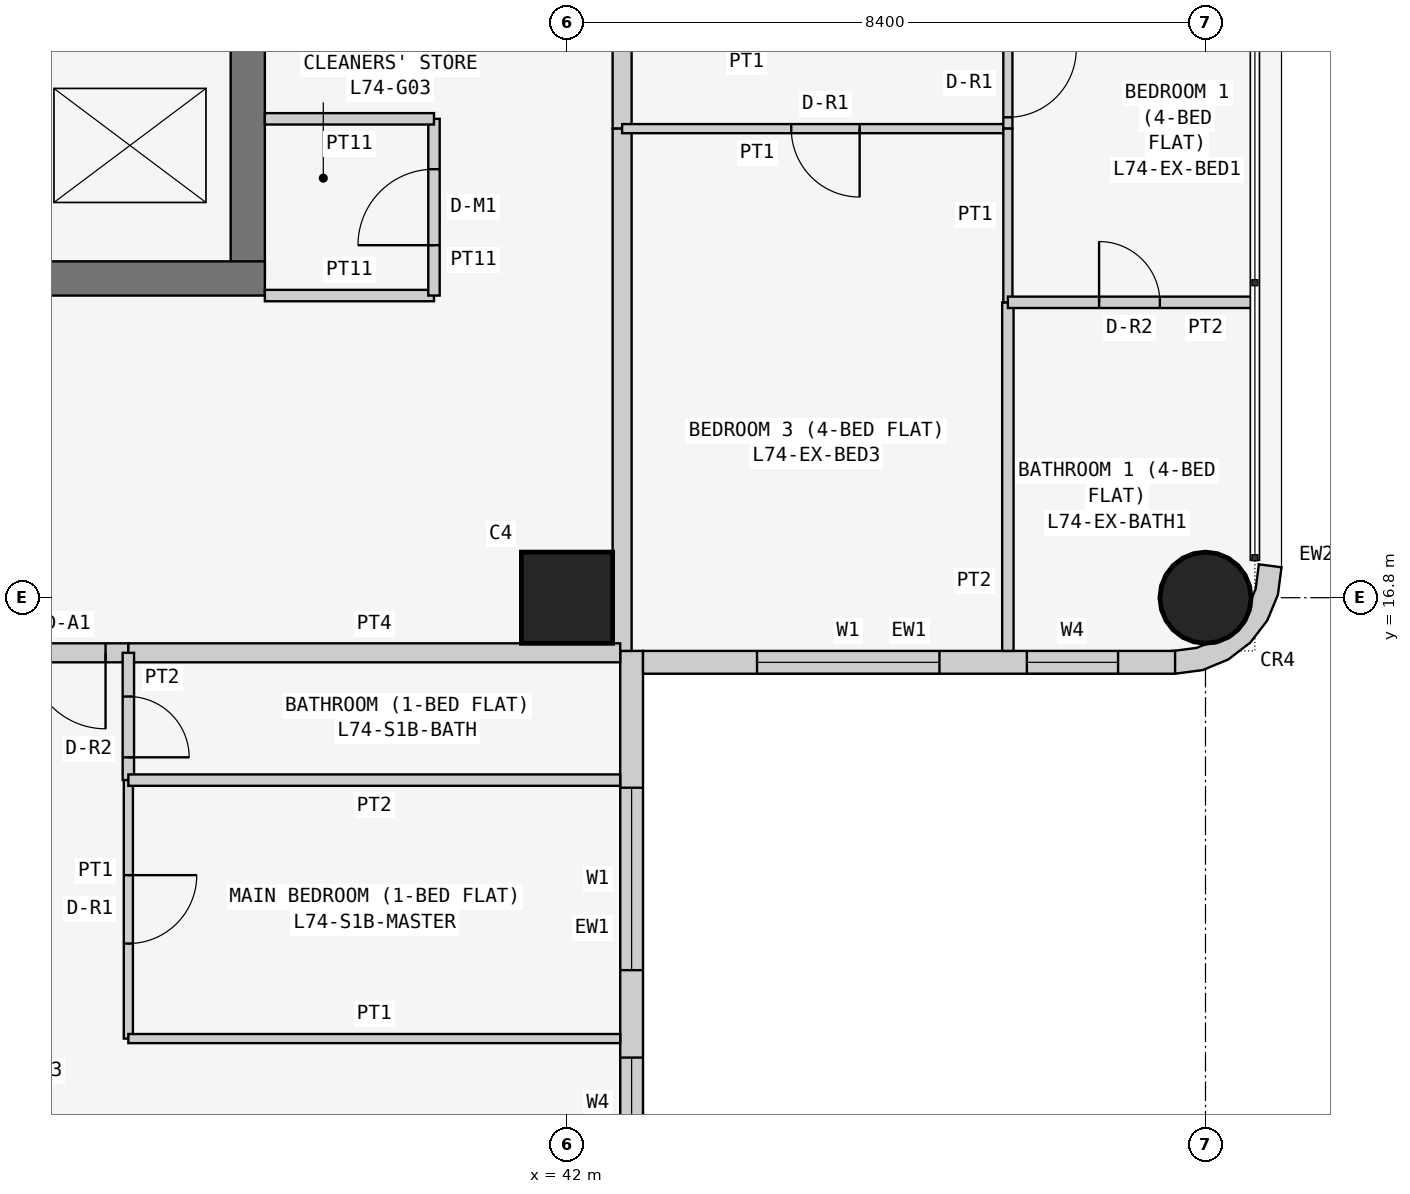
"""IFC4 building model, lengths in metres.
Left out: names, types, materials, properties, quantities, classifications, styles, units other than length and angle.
Written with IfcOpenShell. Run it as: python <this file> out.ifc"""

import sys

from ifc_helpers import new_model, si_unit, direction, frame, frame_2d, origin, origin_2d, place, context, subcontext, project, spatial, polyline, rectangle, circle, outline, extrude, element, fill, save


model = new_model("IFC4")
c1 = context("Model", 3, precision=1e-05, world=origin(), true_north=direction((0.0, 1.0)))
c2 = subcontext(c1, "Body", "Model", "MODEL_VIEW")
j1 = project(units=[si_unit("LENGTHUNIT", "METRE"), si_unit("PLANEANGLEUNIT", "RADIAN")], contexts=[c1])
p1 = place(None, origin())
s1 = spatial("IfcSite", under=j1, at=p1, CompositionType="ELEMENT")
p2 = place(p1, origin())
s2 = spatial("IfcBuilding", under=s1, at=p2, CompositionType="ELEMENT")
p3 = place(p2, frame((0.0, 0.0, 282.9)))
s3 = spatial("IfcBuildingStorey", under=s2, at=p3, CompositionType="ELEMENT", Elevation=282.9)
p4 = place(p3, frame((42.0, 16.8, 0.0), z_axis=(0.0, 0.0, 1.0), x_axis=(1.0, 0.0, 0.0)))
e1 = element("IfcColumn", 1, at=p4, inside=s3, PredefinedType="COLUMN", context=c2, shape_type="SweptSolid", body=[
    extrude(rectangle(XDim=1.2, YDim=1.2, at=origin_2d()), origin(), (0.0, 0.0, 1.0), 3.6),
])
p5 = place(p3, frame((50.4, 16.8, 0.0), z_axis=(0.0, 0.0, 1.0), x_axis=(1.0, 0.0, 0.0)))
e2 = element("IfcColumn", 2, at=p5, inside=s3, PredefinedType="COLUMN", context=c2, shape_type="SweptSolid", body=[
    extrude(circle(Radius=0.6, at=origin_2d()), origin(), (0.0, 0.0, 1.0), 3.6),
])
p6 = place(p3, frame((21.0, 21.0, 0.0), z_axis=(0.0, 0.0, 1.0), x_axis=(1.0, 0.0, 0.0)))
e3 = element("IfcWall", 3, at=p6, inside=s3, PredefinedType="SHEAR", context=c2, shape_type="SweptSolid", body=[
    extrude(rectangle(XDim=17.025, YDim=0.45, at=frame_2d((8.512, 0.0))), origin(), (0.0, 0.0, 1.0), 3.6),
])
p7 = place(p3, frame((37.8, 21.0, 0.0), z_axis=(0.0, 0.0, 1.0), x_axis=(0.0, 1.0, 0.0)))
e4 = element("IfcWall", 4, at=p7, inside=s3, PredefinedType="SHEAR", context=c2, shape_type="SweptSolid", body=[
    extrude(rectangle(XDim=17.025, YDim=0.45, at=frame_2d((8.512, 0.0))), origin(), (0.0, 0.0, 1.0), 3.6),
])
p8 = place(p7, frame((5.2, 0.0, 0.0)))
e5 = element("IfcOpeningElement", 5, at=p8, cuts=e4, PredefinedType="OPENING", context=c2, shape_type="SweptSolid", body=[
    extrude(rectangle(XDim=1.2, YDim=2.1, at=frame_2d((0.6, 1.05))), frame((0.0, 0.235, 0.0), z_axis=(0.0, -1.0, 0.0), x_axis=(1.0, 0.0, 0.0)), (0.0, 0.0, 1.0), 0.47),
])
p9 = place(p3, frame((42.85, 8.8, 0.0), z_axis=(0.0, 0.0, 1.0), x_axis=(0.0, 1.0, 0.0)))
e6 = element("IfcWall", 6, at=p9, inside=s3, PredefinedType="SOLIDWALL", context=c2, shape_type="SweptSolid", body=[
    extrude(rectangle(XDim=7.3, YDim=0.3, at=frame_2d((3.65, 0.0))), origin(), (0.0, 0.0, 1.0), 3.45),
])
p10 = place(p9, frame((3.1, 0.0, 0.9)))
e7 = element("IfcOpeningElement", 7, at=p10, cuts=e6, PredefinedType="OPENING", context=c2, shape_type="SweptSolid", body=[
    extrude(rectangle(XDim=2.4, YDim=1.5, at=frame_2d((1.2, 0.75))), frame((0.0, 0.16, 0.0), z_axis=(0.0, -1.0, 0.0), x_axis=(1.0, 0.0, 0.0)), (0.0, 0.0, 1.0), 0.32),
])
p11 = place(p9, frame((0.75, 0.0, 0.9)))
e8 = element("IfcOpeningElement", 8, at=p11, cuts=e6, PredefinedType="OPENING", context=c2, shape_type="SweptSolid", body=[
    extrude(rectangle(XDim=1.2, YDim=1.5, at=frame_2d((0.6, 0.75))), frame((0.0, 0.16, 0.0), z_axis=(0.0, -1.0, 0.0), x_axis=(1.0, 0.0, 0.0)), (0.0, 0.0, 1.0), 0.32),
])
p12 = place(p3, frame((43.0, 15.95, 0.0), z_axis=(0.0, 0.0, 1.0), x_axis=(1.0, 0.0, 0.0)))
e9 = element("IfcWall", 9, at=p12, inside=s3, PredefinedType="SOLIDWALL", context=c2, shape_type="SweptSolid", body=[
    extrude(rectangle(XDim=7.0, YDim=0.3, at=frame_2d((3.5, 0.0))), origin(), (0.0, 0.0, 1.0), 3.45),
])
p13 = place(p12, frame((1.5, 0.0, 0.9)))
e10 = element("IfcOpeningElement", 10, at=p13, cuts=e9, PredefinedType="OPENING", context=c2, shape_type="SweptSolid", body=[
    extrude(rectangle(XDim=2.4, YDim=1.5, at=frame_2d((1.2, 0.75))), frame((0.0, 0.16, 0.0), z_axis=(0.0, -1.0, 0.0), x_axis=(1.0, 0.0, 0.0)), (0.0, 0.0, 1.0), 0.32),
])
p14 = place(p12, frame((5.05, 0.0, 0.9)))
e11 = element("IfcOpeningElement", 11, at=p14, cuts=e9, PredefinedType="OPENING", context=c2, shape_type="SweptSolid", body=[
    extrude(rectangle(XDim=1.2, YDim=1.5, at=frame_2d((0.6, 0.75))), frame((0.0, 0.16, 0.0), z_axis=(0.0, -1.0, 0.0), x_axis=(1.0, 0.0, 0.0)), (0.0, 0.0, 1.0), 0.32),
])
p15 = place(p3, frame((50.038, 16.224, 0.0), z_axis=(0.0, 0.0, 1.0), x_axis=(0.707106781187, -0.707106781187, 0.0)))
e12 = element("IfcWall", 12, at=p15, inside=s3, PredefinedType="SOLIDWALL", context=c2, shape_type="SweptSolid", body=[
    extrude(outline(polyline([(0.047, 1.455), (0.233, 1.212), (0.292, 1.069), (0.358, 1.003), (0.449, 0.782), (0.449, 0.543), (0.358, 0.322), (0.292, 0.257), (0.233, 0.114), (0.047, -0.129), (0.033, -0.143), (0.273, -0.327), (0.495, -0.037), (0.635, 0.301), (0.683, 0.663), (0.635, 1.025), (0.495, 1.363), (0.273, 1.653), (0.033, 1.469), (0.047, 1.455)])), origin(), (0.0, 0.0, 1.0), 3.45),
])
p16 = place(p3, frame((38.025, 20.775, 0.0), z_axis=(0.0, 0.0, 1.0), x_axis=(1.0, 0.0, 0.0)))
e13 = element("IfcWall", 13, at=p16, inside=s3, PredefinedType="PARTITIONING", context=c2, shape_type="SweptSolid", body=[
    extrude(rectangle(XDim=2.225, YDim=0.15, at=frame_2d((1.113, 0.0))), origin(), (0.0, 0.0, 1.0), 3.45),
])
p17 = place(p3, frame((40.25, 20.775, 0.0), z_axis=(0.0, 0.0, 1.0), x_axis=(0.0, 1.0, 0.0)))
e14 = element("IfcWall", 14, at=p17, inside=s3, PredefinedType="PARTITIONING", context=c2, shape_type="SweptSolid", body=[
    extrude(rectangle(XDim=2.325, YDim=0.15, at=frame_2d((1.163, 0.0))), origin(), (0.0, 0.0, 1.0), 3.45),
])
p18 = place(p17, frame((0.663, 0.0, 0.0)))
e15 = element("IfcOpeningElement", 15, at=p18, cuts=e14, PredefinedType="OPENING", context=c2, shape_type="SweptSolid", body=[
    extrude(rectangle(XDim=1.0, YDim=2.1, at=frame_2d((0.5, 1.05))), frame((0.0, 0.085, 0.0), z_axis=(0.0, -1.0, 0.0), x_axis=(1.0, 0.0, 0.0)), (0.0, 0.0, 1.0), 0.17),
])
p19 = place(p3, frame((40.25, 23.1, 0.0), z_axis=(0.0, 0.0, 1.0), x_axis=(-1.0, 0.0, 0.0)))
e16 = element("IfcWall", 16, at=p19, inside=s3, PredefinedType="PARTITIONING", context=c2, shape_type="SweptSolid", body=[
    extrude(rectangle(XDim=2.225, YDim=0.15, at=frame_2d((1.113, 0.0))), origin(), (0.0, 0.0, 1.0), 3.45),
])
p20 = place(p3, frame((42.725, 24.171, 0.0), z_axis=(0.0, 0.0, 1.0), x_axis=(0.0, -1.0, 0.0)))
e17 = element("IfcWall", 17, at=p20, inside=s3, PredefinedType="PARTITIONING", context=c2, shape_type="SweptSolid", body=[
    extrude(rectangle(XDim=1.2, YDim=0.25, at=frame_2d((0.6, 0.0))), origin(), (0.0, 0.0, 1.0), 3.45),
])
p21 = place(p3, frame((42.725, 22.971, 0.0), z_axis=(0.0, 0.0, 1.0), x_axis=(0.0, -1.0, 0.0)))
e18 = element("IfcWall", 18, at=p21, inside=s3, PredefinedType="PARTITIONING", context=c2, shape_type="SweptSolid", body=[
    extrude(rectangle(XDim=6.871, YDim=0.25, at=frame_2d((3.436, 0.0))), origin(), (0.0, 0.0, 1.0), 3.45),
])
p22 = place(p3, frame((36.229, 16.075, 0.0), z_axis=(0.0, 0.0, 1.0), x_axis=(-1.0, 0.0, 0.0)))
e19 = element("IfcWall", 19, at=p22, inside=s3, PredefinedType="PARTITIONING", context=c2, shape_type="SweptSolid", body=[
    extrude(rectangle(XDim=1.6, YDim=0.25, at=frame_2d((0.8, 0.0))), origin(), (0.0, 0.0, 1.0), 3.45),
])
p23 = place(p22, frame((0.3, 0.0, 0.0)))
e20 = element("IfcOpeningElement", 20, at=p23, cuts=e19, PredefinedType="OPENING", context=c2, shape_type="SweptSolid", body=[
    extrude(rectangle(XDim=1.0, YDim=2.1, at=frame_2d((0.5, 1.05))), frame((0.0, 0.135, 0.0), z_axis=(0.0, -1.0, 0.0), x_axis=(1.0, 0.0, 0.0)), (0.0, 0.0, 1.0), 0.27),
])
p24 = place(p3, frame((42.7, 16.075, 0.0), z_axis=(0.0, 0.0, 1.0), x_axis=(-1.0, 0.0, 0.0)))
e21 = element("IfcWall", 21, at=p24, inside=s3, PredefinedType="PARTITIONING", context=c2, shape_type="SweptSolid", body=[
    extrude(rectangle(XDim=6.471, YDim=0.25, at=frame_2d((3.235, 0.0))), origin(), (0.0, 0.0, 1.0), 3.45),
])
p25 = place(p3, frame((47.8, 22.971, 0.0), z_axis=(0.0, 0.0, 1.0), x_axis=(-1.0, 0.0, 0.0)))
e22 = element("IfcWall", 22, at=p25, inside=s3, PredefinedType="PARTITIONING", context=c2, shape_type="SweptSolid", body=[
    extrude(rectangle(XDim=5.075, YDim=0.12, at=frame_2d((2.538, 0.0))), origin(), (0.0, 0.0, 1.0), 3.45),
])
p26 = place(p25, frame((1.95, 0.0, 0.0)))
e23 = element("IfcOpeningElement", 23, at=p26, cuts=e22, PredefinedType="OPENING", context=c2, shape_type="SweptSolid", body=[
    extrude(rectangle(XDim=0.9, YDim=2.1, at=frame_2d((0.45, 1.05))), frame((0.0, 0.07, 0.0), z_axis=(0.0, -1.0, 0.0), x_axis=(1.0, 0.0, 0.0)), (0.0, 0.0, 1.0), 0.14),
])
p27 = place(p3, frame((47.8, 24.171, 0.0), z_axis=(0.0, 0.0, 1.0), x_axis=(0.0, -1.0, 0.0)))
e24 = element("IfcWall", 24, at=p27, inside=s3, PredefinedType="PARTITIONING", context=c2, shape_type="SweptSolid", body=[
    extrude(rectangle(XDim=1.2, YDim=0.12, at=frame_2d((0.6, 0.0))), origin(), (0.0, 0.0, 1.0), 3.45),
])
p28 = place(p27, frame((0.151, 0.0, 0.0)))
e25 = element("IfcOpeningElement", 25, at=p28, cuts=e24, PredefinedType="OPENING", context=c2, shape_type="SweptSolid", body=[
    extrude(rectangle(XDim=0.9, YDim=2.1, at=frame_2d((0.45, 1.05))), frame((0.0, 0.07, 0.0), z_axis=(0.0, -1.0, 0.0), x_axis=(1.0, 0.0, 0.0)), (0.0, 0.0, 1.0), 0.14),
])
p29 = place(p3, frame((47.8, 16.1, 0.0), z_axis=(0.0, 0.0, 1.0), x_axis=(0.0, 1.0, 0.0)))
e26 = element("IfcWall", 26, at=p29, inside=s3, PredefinedType="PARTITIONING", context=c2, shape_type="SweptSolid", body=[
    extrude(rectangle(XDim=4.586, YDim=0.15, at=frame_2d((2.293, 0.0))), origin(), (0.0, 0.0, 1.0), 3.45),
])
p30 = place(p3, frame((47.8, 20.686, 0.0), z_axis=(0.0, 0.0, 1.0), x_axis=(0.0, 1.0, 0.0)))
e27 = element("IfcWall", 27, at=p30, inside=s3, PredefinedType="PARTITIONING", context=c2, shape_type="SweptSolid", body=[
    extrude(rectangle(XDim=2.285, YDim=0.12, at=frame_2d((1.143, 0.0))), origin(), (0.0, 0.0, 1.0), 3.45),
])
p31 = place(p3, frame((51.05, 20.686, 0.0), z_axis=(0.0, 0.0, 1.0), x_axis=(-1.0, 0.0, 0.0)))
e28 = element("IfcWall", 28, at=p31, inside=s3, PredefinedType="PARTITIONING", context=c2, shape_type="SweptSolid", body=[
    extrude(rectangle(XDim=3.25, YDim=0.15, at=frame_2d((1.625, 0.0))), origin(), (0.0, 0.0, 1.0), 3.45),
])
p32 = place(p31, frame((1.25, 0.0, 0.0)))
e29 = element("IfcOpeningElement", 29, at=p32, cuts=e28, PredefinedType="OPENING", context=c2, shape_type="SweptSolid", body=[
    extrude(rectangle(XDim=0.8, YDim=2.1, at=frame_2d((0.4, 1.05))), frame((0.0, 0.085, 0.0), z_axis=(0.0, -1.0, 0.0), x_axis=(1.0, 0.0, 0.0)), (0.0, 0.0, 1.0), 0.17),
])
p33 = place(p3, frame((36.229, 16.075, 0.0), z_axis=(0.0, 0.0, 1.0), x_axis=(0.0, -1.0, 0.0)))
e30 = element("IfcWall", 30, at=p33, inside=s3, PredefinedType="PARTITIONING", context=c2, shape_type="SweptSolid", body=[
    extrude(rectangle(XDim=1.675, YDim=0.15, at=frame_2d((0.837, 0.0))), origin(), (0.0, 0.0, 1.0), 3.45),
])
p34 = place(p33, frame((0.575, 0.0, 0.0)))
e31 = element("IfcOpeningElement", 31, at=p34, cuts=e30, PredefinedType="OPENING", context=c2, shape_type="SweptSolid", body=[
    extrude(rectangle(XDim=0.8, YDim=2.1, at=frame_2d((0.4, 1.05))), frame((0.0, 0.085, 0.0), z_axis=(0.0, -1.0, 0.0), x_axis=(1.0, 0.0, 0.0)), (0.0, 0.0, 1.0), 0.17),
])
p35 = place(p3, frame((36.229, 14.4, 0.0), z_axis=(0.0, 0.0, 1.0), x_axis=(0.0, -1.0, 0.0)))
e32 = element("IfcWall", 32, at=p35, inside=s3, PredefinedType="PARTITIONING", context=c2, shape_type="SweptSolid", body=[
    extrude(rectangle(XDim=3.4, YDim=0.12, at=frame_2d((1.7, 0.0))), origin(), (0.0, 0.0, 1.0), 3.45),
])
p36 = place(p35, frame((1.25, 0.0, 0.0)))
e33 = element("IfcOpeningElement", 33, at=p36, cuts=e32, PredefinedType="OPENING", context=c2, shape_type="SweptSolid", body=[
    extrude(rectangle(XDim=0.9, YDim=2.1, at=frame_2d((0.45, 1.05))), frame((0.0, 0.07, 0.0), z_axis=(0.0, -1.0, 0.0), x_axis=(1.0, 0.0, 0.0)), (0.0, 0.0, 1.0), 0.14),
])
p37 = place(p3, frame((36.229, 11.0, 0.0), z_axis=(0.0, 0.0, 1.0), x_axis=(1.0, 0.0, 0.0)))
e34 = element("IfcWall", 34, at=p37, inside=s3, PredefinedType="PARTITIONING", context=c2, shape_type="SweptSolid", body=[
    extrude(rectangle(XDim=6.471, YDim=0.12, at=frame_2d((3.235, 0.0))), origin(), (0.0, 0.0, 1.0), 3.45),
])
p38 = place(p3, frame((36.229, 14.4, 0.0), z_axis=(0.0, 0.0, 1.0), x_axis=(1.0, 0.0, 0.0)))
e35 = element("IfcWall", 35, at=p38, inside=s3, PredefinedType="PARTITIONING", context=c2, shape_type="SweptSolid", body=[
    extrude(rectangle(XDim=6.471, YDim=0.15, at=frame_2d((3.235, 0.0))), origin(), (0.0, 0.0, 1.0), 3.45),
])
p39 = place(p13, origin())
e36 = element("IfcWindow", 36, at=p39, inside=s3, PartitioningType="SINGLE_PANEL", PredefinedType="WINDOW", context=c2, shape_type="SweptSolid", body=[
    extrude(rectangle(XDim=2.4, YDim=1.5, at=frame_2d((1.2, 0.75))), frame((0.0, 0.03, 0.0), z_axis=(0.0, -1.0, 0.0), x_axis=(1.0, 0.0, 0.0)), (0.0, 0.0, 1.0), 0.06),
])
fill(e10, e36)
p40 = place(p14, origin())
e37 = element("IfcWindow", 37, at=p40, inside=s3, PartitioningType="SINGLE_PANEL", PredefinedType="WINDOW", context=c2, shape_type="SweptSolid", body=[
    extrude(rectangle(XDim=1.2, YDim=1.5, at=frame_2d((0.6, 0.75))), frame((0.0, 0.03, 0.0), z_axis=(0.0, -1.0, 0.0), x_axis=(1.0, 0.0, 0.0)), (0.0, 0.0, 1.0), 0.06),
])
fill(e11, e37)
p41 = place(p10, origin())
e38 = element("IfcWindow", 38, at=p41, inside=s3, PartitioningType="SINGLE_PANEL", PredefinedType="WINDOW", context=c2, shape_type="SweptSolid", body=[
    extrude(rectangle(XDim=2.4, YDim=1.5, at=frame_2d((1.2, 0.75))), frame((0.0, 0.03, 0.0), z_axis=(0.0, -1.0, 0.0), x_axis=(1.0, 0.0, 0.0)), (0.0, 0.0, 1.0), 0.06),
])
fill(e7, e38)
p42 = place(p11, origin())
e39 = element("IfcWindow", 39, at=p42, inside=s3, PartitioningType="SINGLE_PANEL", PredefinedType="WINDOW", context=c2, shape_type="SweptSolid", body=[
    extrude(rectangle(XDim=1.2, YDim=1.5, at=frame_2d((0.6, 0.75))), frame((0.0, 0.03, 0.0), z_axis=(0.0, -1.0, 0.0), x_axis=(1.0, 0.0, 0.0)), (0.0, 0.0, 1.0), 0.06),
])
fill(e8, e39)
p43 = place(p18, origin())
e40 = element("IfcDoor", 40, at=p43, inside=s3, OperationType="SINGLE_SWING_LEFT", PredefinedType="DOOR", context=c2, shape_type="SweptSolid", body=[
    extrude(rectangle(XDim=1.0, YDim=2.1, at=frame_2d((0.5, 1.05))), frame((0.0, 0.025, 0.0), z_axis=(0.0, -1.0, 0.0), x_axis=(1.0, 0.0, 0.0)), (0.0, 0.0, 1.0), 0.05),
])
fill(e15, e40)
p44 = place(p26, origin())
e41 = element("IfcDoor", 41, at=p44, inside=s3, OperationType="SINGLE_SWING_LEFT", PredefinedType="DOOR", context=c2, shape_type="SweptSolid", body=[
    extrude(rectangle(XDim=0.9, YDim=2.1, at=frame_2d((0.45, 1.05))), frame((0.0, 0.025, 0.0), z_axis=(0.0, -1.0, 0.0), x_axis=(1.0, 0.0, 0.0)), (0.0, 0.0, 1.0), 0.05),
])
fill(e23, e41)
p45 = place(p28, origin())
e42 = element("IfcDoor", 42, at=p45, inside=s3, OperationType="SINGLE_SWING_LEFT", PredefinedType="DOOR", context=c2, shape_type="SweptSolid", body=[
    extrude(rectangle(XDim=0.9, YDim=2.1, at=frame_2d((0.45, 1.05))), frame((0.0, 0.025, 0.0), z_axis=(0.0, -1.0, 0.0), x_axis=(1.0, 0.0, 0.0)), (0.0, 0.0, 1.0), 0.05),
])
fill(e25, e42)
p46 = place(p32, frame((0.8, 0.0, 0.0), z_axis=(0.0, 0.0, 1.0), x_axis=(-1.0, 0.0, 0.0)))
e43 = element("IfcDoor", 43, at=p46, inside=s3, OperationType="SINGLE_SWING_LEFT", PredefinedType="DOOR", context=c2, shape_type="SweptSolid", body=[
    extrude(rectangle(XDim=0.8, YDim=2.1, at=frame_2d((0.4, 1.05))), frame((0.0, 0.025, 0.0), z_axis=(0.0, -1.0, 0.0), x_axis=(1.0, 0.0, 0.0)), (0.0, 0.0, 1.0), 0.05),
])
fill(e29, e43)
p47 = place(p23, origin())
e44 = element("IfcDoor", 44, at=p47, inside=s3, OperationType="SINGLE_SWING_LEFT", PredefinedType="DOOR", context=c2, shape_type="SweptSolid", body=[
    extrude(rectangle(XDim=1.0, YDim=2.1, at=frame_2d((0.5, 1.05))), frame((0.0, 0.025, 0.0), z_axis=(0.0, -1.0, 0.0), x_axis=(1.0, 0.0, 0.0)), (0.0, 0.0, 1.0), 0.05),
])
fill(e20, e44)
p48 = place(p34, origin())
e45 = element("IfcDoor", 45, at=p48, inside=s3, OperationType="SINGLE_SWING_RIGHT", PredefinedType="DOOR", context=c2, shape_type="SweptSolid", body=[
    extrude(rectangle(XDim=0.8, YDim=2.1, at=frame_2d((0.4, 1.05))), frame((0.0, 0.025, 0.0), z_axis=(0.0, -1.0, 0.0), x_axis=(1.0, 0.0, 0.0)), (0.0, 0.0, 1.0), 0.05),
])
fill(e31, e45)
p49 = place(p36, origin())
e46 = element("IfcDoor", 46, at=p49, inside=s3, OperationType="SINGLE_SWING_LEFT", PredefinedType="DOOR", context=c2, shape_type="SweptSolid", body=[
    extrude(rectangle(XDim=0.9, YDim=2.1, at=frame_2d((0.45, 1.05))), frame((0.0, 0.025, 0.0), z_axis=(0.0, -1.0, 0.0), x_axis=(1.0, 0.0, 0.0)), (0.0, 0.0, 1.0), 0.05),
])
fill(e33, e46)
save(model, sys.argv[1])
